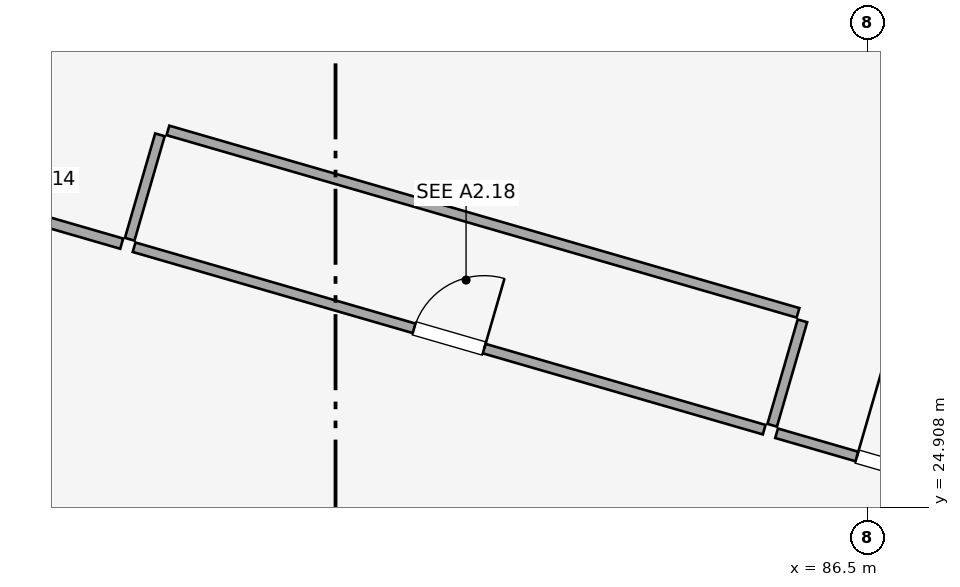
"""IFC4 building model, lengths in metres.
Left out: names, types, materials, properties, quantities, classifications, styles, units other than length and angle.
Written with IfcOpenShell. Run it as: python <this file> out.ifc"""

import sys

from ifc_helpers import new_model, si_unit, direction, frame, frame_2d, origin, place, context, subcontext, project, spatial, rectangle, extrude, element, fill, save


model = new_model("IFC4")
c1 = context("Model", 3, precision=1e-05, world=origin(), true_north=direction((0.0, 1.0)))
c2 = subcontext(c1, "Body", "Model", "MODEL_VIEW")
j1 = project(units=[si_unit("LENGTHUNIT", "METRE"), si_unit("PLANEANGLEUNIT", "RADIAN")], contexts=[c1])
p1 = place(None, origin())
s1 = spatial("IfcSite", under=j1, at=p1, CompositionType="ELEMENT")
p2 = place(p1, origin())
s2 = spatial("IfcBuilding", under=s1, at=p2, CompositionType="ELEMENT")
p3 = place(p2, origin())
s3 = spatial("IfcBuildingStorey", under=s2, at=p3, CompositionType="ELEMENT", Elevation=0.0)
p4 = place(p3, frame((82.326, 39.803, 0.0), z_axis=(0.0, 0.0, 1.0), x_axis=(-0.611581787037, -0.791181216767, 0.0)))
e1 = element("IfcWall", 1, at=p4, inside=s3, PredefinedType="PARTITIONING", context=c2, shape_type="SweptSolid", body=[
    extrude(rectangle(XDim=13.401, YDim=0.1, at=frame_2d((6.7, 0.0))), origin(), (0.0, 0.0, 1.0), 3.69),
])
p5 = place(p3, frame((76.85, 28.331, 0.0), z_axis=(0.0, 0.0, 1.0), x_axis=(0.960547560025, -0.278115776127, 0.0)))
e2 = element("IfcWall", 2, at=p5, inside=s3, PredefinedType="PARTITIONING", context=c2, shape_type="SweptSolid", body=[
    extrude(rectangle(XDim=8.63, YDim=0.13, at=frame_2d((4.315, 0.0))), origin(), (0.0, 0.0, 1.0), 3.69),
])
p6 = place(p5, frame((3.835, 0.0, 0.0)))
e3 = element("IfcOpeningElement", 3, at=p6, cuts=e2, PredefinedType="OPENING", context=c2, shape_type="SweptSolid", body=[
    extrude(rectangle(XDim=0.96, YDim=2.24, at=frame_2d((0.48, 1.12))), frame((0.0, 0.075, 0.0), z_axis=(0.0, -1.0, 0.0), x_axis=(1.0, 0.0, 0.0)), (0.0, 0.0, 1.0), 0.15),
])
p7 = place(p3, frame((77.295, 29.868, 0.0), z_axis=(0.0, 0.0, 1.0), x_axis=(0.960549748096, -0.278108218923, 0.0)))
e4 = element("IfcWall", 4, at=p7, inside=s3, PredefinedType="PARTITIONING", context=c2, shape_type="SweptSolid", body=[
    extrude(rectangle(XDim=8.63, YDim=0.13, at=frame_2d((4.315, 0.0))), origin(), (0.0, 0.0, 1.0), 3.69),
])
p8 = place(p3, frame((76.792, 28.436, 0.0), z_axis=(0.0, 0.0, 1.0), x_axis=(0.278078801072, 0.960558264966, 0.0)))
e5 = element("IfcWall", 5, at=p8, inside=s3, PredefinedType="PARTITIONING", context=c2, shape_type="SweptSolid", body=[
    extrude(rectangle(XDim=1.43, YDim=0.13, at=frame_2d((0.715, 0.0))), origin(), (0.0, 0.0, 1.0), 3.69),
])
p9 = place(p3, frame((85.245, 25.989, 0.0), z_axis=(0.0, 0.0, 1.0), x_axis=(0.278124405459, 0.960545061456, 0.0)))
e6 = element("IfcWall", 6, at=p9, inside=s3, PredefinedType="PARTITIONING", context=c2, shape_type="SweptSolid", body=[
    extrude(rectangle(XDim=1.43, YDim=0.13, at=frame_2d((0.715, 0.0))), origin(), (0.0, 0.0, 1.0), 3.69),
])
p10 = place(p3, frame((74.16, 29.11, 0.0), z_axis=(0.0, 0.0, 1.0), x_axis=(0.960526414814, -0.278188796405, 0.0)))
e7 = element("IfcWall", 7, at=p10, inside=s3, PredefinedType="PARTITIONING", context=c2, shape_type="SweptSolid", body=[
    extrude(rectangle(XDim=2.63, YDim=0.14, at=frame_2d((1.315, 0.0))), origin(), (0.0, 0.0, 1.0), 3.69),
])
p11 = place(p3, frame((85.303, 25.884, 0.0), z_axis=(0.0, 0.0, 1.0), x_axis=(0.960550123967, -0.278106920709, 0.0)))
e8 = element("IfcWall", 8, at=p11, inside=s3, PredefinedType="PARTITIONING", context=c2, shape_type="SweptSolid", body=[
    extrude(rectangle(XDim=8.253, YDim=0.13, at=frame_2d((4.126, 0.0))), origin(), (0.0, 0.0, 1.0), 3.69),
])
p12 = place(p11, frame((1.1, 0.0, 0.0)))
e9 = element("IfcOpeningElement", 9, at=p12, cuts=e8, PredefinedType="OPENING", context=c2, shape_type="SweptSolid", body=[
    extrude(rectangle(XDim=1.44, YDim=2.24, at=frame_2d((0.72, 1.12))), frame((0.0, 0.075, 0.0), z_axis=(0.0, -1.0, 0.0), x_axis=(1.0, 0.0, 0.0)), (0.0, 0.0, 1.0), 0.15),
])
p13 = place(p6, origin())
e10 = element("IfcDoor", 10, at=p13, inside=s3, OperationType="SINGLE_SWING_RIGHT", PredefinedType="DOOR", context=c2, shape_type="SweptSolid", body=[
    extrude(rectangle(XDim=0.96, YDim=2.24, at=frame_2d((0.48, 1.12))), frame((0.0, 0.025, 0.0), z_axis=(0.0, -1.0, 0.0), x_axis=(1.0, 0.0, 0.0)), (0.0, 0.0, 1.0), 0.05),
])
fill(e3, e10)
p14 = place(p12, origin())
e11 = element("IfcDoor", 11, at=p14, inside=s3, OperationType="SINGLE_SWING_LEFT", PredefinedType="DOOR", context=c2, shape_type="SweptSolid", body=[
    extrude(rectangle(XDim=1.44, YDim=2.24, at=frame_2d((0.72, 1.12))), frame((0.0, 0.025, 0.0), z_axis=(0.0, -1.0, 0.0), x_axis=(1.0, 0.0, 0.0)), (0.0, 0.0, 1.0), 0.05),
])
fill(e9, e11)
save(model, sys.argv[1])
